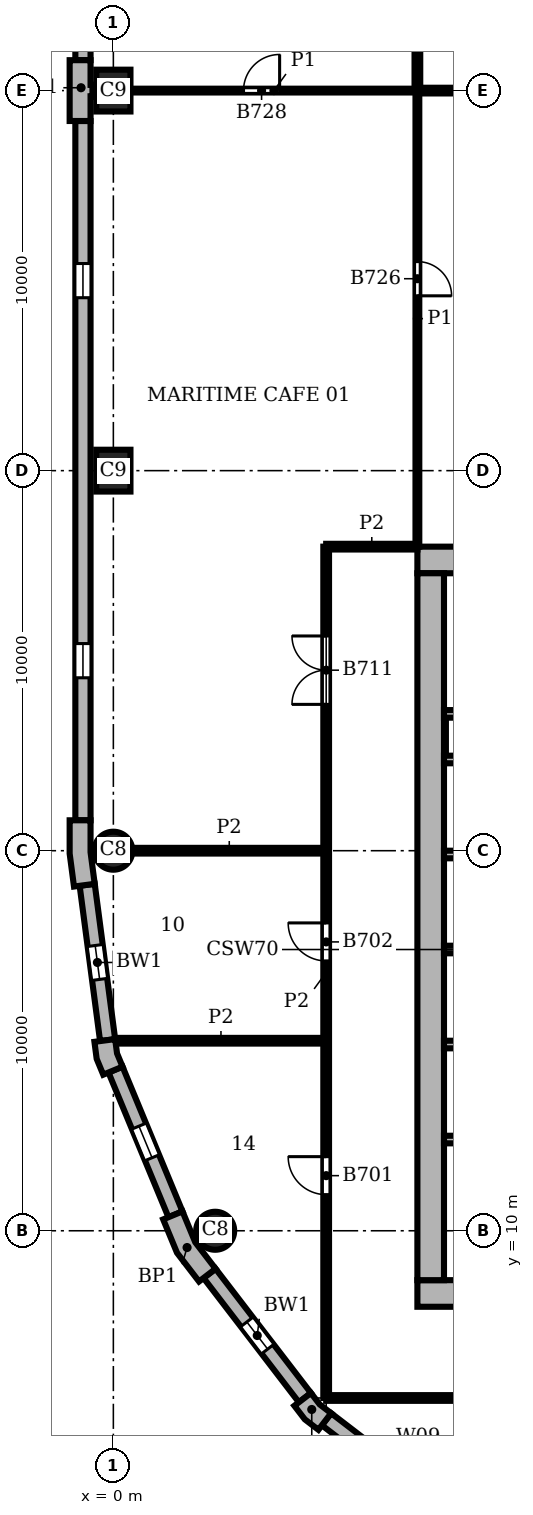
"""IFC4 building model, lengths in metres.
Left out: names, types, materials, properties, quantities, classifications, styles, units other than length and angle.
Written with IfcOpenShell. Run it as: python <this file> out.ifc"""

import sys

from ifc_helpers import new_model, si_unit, direction, frame, frame_2d, origin, origin_2d, place, context, subcontext, project, spatial, polyline, rectangle, circle, outline, extrude, element, fill, save


model = new_model("IFC4")
c1 = context("Model", 3, precision=1e-05, world=origin(), true_north=direction((0.0, 1.0)))
c2 = subcontext(c1, "Body", "Model", "MODEL_VIEW")
j1 = project(units=[si_unit("LENGTHUNIT", "METRE"), si_unit("PLANEANGLEUNIT", "RADIAN")], contexts=[c1])
p1 = place(None, origin())
s1 = spatial("IfcSite", under=j1, at=p1, CompositionType="ELEMENT")
p2 = place(p1, origin())
s2 = spatial("IfcBuilding", under=s1, at=p2, CompositionType="ELEMENT")
p3 = place(p2, frame((0.0, 0.0, 209.7)))
s3 = spatial("IfcBuildingStorey", under=s2, at=p3, CompositionType="ELEMENT", Elevation=209.7)
for number, where, z_axis, x_axis in (
    (1, (0.0, 40.0, 0.0), (0.0, 0.0, 1.0), (0.0, 1.0, 0.0)),
    (2, (0.0, 30.0, 0.0), (0.0, 0.0, 1.0), (0.0, 1.0, 0.0)),
):
    element("IfcColumn", number, at=place(p3, frame(where, z_axis=z_axis, x_axis=x_axis)), inside=s3, PredefinedType="COLUMN", context=c2, shape_type="SweptSolid", body=[
        extrude(rectangle(XDim=1.1, YDim=0.9, at=origin_2d()), origin(), (0.0, 0.0, 1.0), 3.9),
    ])
for number, where, z_axis, x_axis in (
    (3, (0.0, 20.0, 0.0), (0.0, 0.0, 1.0), (1.0, 0.0, 0.0)),
    (4, (2.679, 10.0, 0.0), (0.0, 0.0, 1.0), (1.0, 0.0, 0.0)),
):
    element("IfcColumn", number, at=place(p3, frame(where, z_axis=z_axis, x_axis=x_axis)), inside=s3, PredefinedType="COLUMN", context=c2, shape_type="SweptSolid", body=[
        extrude(circle(Radius=0.5, at=origin_2d()), origin(), (0.0, 0.0, 1.0), 3.9),
    ])
for number, where, z_axis, x_axis in (
    (5, (8.0, 8.35, 0.0), (0.0, 0.0, 1.0), (1.0, 0.0, 0.0)),
    (6, (28.0, 27.65, 0.0), (0.0, 0.0, 1.0), (-1.0, 0.0, 0.0)),
):
    element("IfcWall", number, at=place(p3, frame(where, z_axis=z_axis, x_axis=x_axis)), inside=s3, PredefinedType="SHEAR", context=c2, shape_type="SweptSolid", body=[
        extrude(rectangle(XDim=20.0, YDim=0.7, at=frame_2d((10.0, 0.0))), origin(), (0.0, 0.0, 1.0), 3.9),
    ])
p4 = place(p3, frame((8.35, 27.3, 0.0), z_axis=(0.0, 0.0, 1.0), x_axis=(0.0, -1.0, 0.0)))
e7 = element("IfcWall", 7, at=p4, inside=s3, PredefinedType="SHEAR", context=c2, shape_type="SweptSolid", body=[
    extrude(rectangle(XDim=18.6, YDim=0.7, at=frame_2d((9.3, 0.0))), origin(), (0.0, 0.0, 1.0), 3.9),
])
p5 = place(p3, origin())
e8 = element("IfcWall", 8, at=p5, inside=s3, PredefinedType="SOLIDWALL", context=c2, shape_type="SweptSolid", body=[
    extrude(outline(polyline([(-0.6, 39.2), (-0.6, 39.85), (-0.55, 39.85), (-0.55, 40.15), (-0.6, 40.15), (-0.6, 40.8), (-1.0, 40.8), (-1.15, 40.8), (-1.15, 40.0), (-1.15, 39.2), (-1.0, 39.2), (-0.6, 39.2)])), origin(), (0.0, 0.0, 1.0), 3.9),
])
e9 = element("IfcWall", 9, at=p5, inside=s3, PredefinedType="SOLIDWALL", context=c2, shape_type="SweptSolid", body=[
    extrude(outline(polyline([(-1.0, 20.8), (-1.15, 20.8), (-1.15, 19.925), (-1.036, 19.057), (-0.887, 19.076), (-0.49, 19.128), (-0.6, 19.961), (-0.6, 20.8), (-1.0, 20.8)])), origin(), (0.0, 0.0, 1.0), 3.9),
])
e10 = element("IfcWall", 10, at=p5, inside=s3, PredefinedType="SOLIDWALL", context=c2, shape_type="SweptSolid", body=[
    extrude(outline(polyline([(-0.349, 14.99), (-0.498, 14.971), (-0.439, 14.523), (-0.266, 14.106), (-0.128, 14.164), (0.242, 14.317), (0.097, 14.667), (0.047, 15.043), (-0.349, 14.99)])), origin(), (0.0, 0.0, 1.0), 3.9),
])
e11 = element("IfcWall", 11, at=p5, inside=s3, PredefinedType="SOLIDWALL", context=c2, shape_type="SweptSolid", body=[
    extrude(outline(polyline([(1.449, 10.356), (1.311, 10.299), (1.675, 9.42), (2.254, 8.665), (2.373, 8.757), (2.69, 9.0), (2.155, 9.698), (1.819, 10.51), (1.449, 10.356)])), origin(), (0.0, 0.0, 1.0), 3.9),
])
e12 = element("IfcWall", 12, at=p5, inside=s3, PredefinedType="SOLIDWALL", context=c2, shape_type="SweptSolid", body=[
    extrude(outline(polyline([(4.882, 5.487), (4.763, 5.396), (5.038, 5.038), (5.396, 4.763), (5.487, 4.882), (5.731, 5.199), (5.43, 5.43), (5.199, 5.731), (4.882, 5.487)])), origin(), (0.0, 0.0, 1.0), 3.9),
])
p6 = place(p3, frame((-0.8, 59.2, 0.0), z_axis=(0.0, 0.0, 1.0), x_axis=(0.0, -1.0, 0.0)))
e13 = element("IfcWall", 13, at=p6, inside=s3, PredefinedType="SOLIDWALL", context=c2, shape_type="SweptSolid", body=[
    extrude(rectangle(XDim=18.4, YDim=0.4, at=frame_2d((9.2, 0.0))), origin(), (0.0, 0.0, 1.0), 3.9),
])
p7 = place(p6, frame((3.75, 0.0, 0.9)))
e14 = element("IfcOpeningElement", 14, at=p7, cuts=e13, PredefinedType="OPENING", context=c2, shape_type="SweptSolid", body=[
    extrude(rectangle(XDim=0.9, YDim=2.35, at=frame_2d((0.45, 1.175))), frame((0.0, 0.21, 0.0), z_axis=(0.0, -1.0, 0.0), x_axis=(1.0, 0.0, 0.0)), (0.0, 0.0, 1.0), 0.42),
])
p8 = place(p6, frame((13.75, 0.0, 0.9)))
e15 = element("IfcOpeningElement", 15, at=p8, cuts=e13, PredefinedType="OPENING", context=c2, shape_type="SweptSolid", body=[
    extrude(rectangle(XDim=0.9, YDim=2.35, at=frame_2d((0.45, 1.175))), frame((0.0, 0.21, 0.0), z_axis=(0.0, -1.0, 0.0), x_axis=(1.0, 0.0, 0.0)), (0.0, 0.0, 1.0), 0.42),
])
p9 = place(p3, frame((-0.8, 39.2, 0.0), z_axis=(0.0, 0.0, 1.0), x_axis=(0.0, -1.0, 0.0)))
e16 = element("IfcWall", 16, at=p9, inside=s3, PredefinedType="SOLIDWALL", context=c2, shape_type="SweptSolid", body=[
    extrude(rectangle(XDim=18.4, YDim=0.4, at=frame_2d((9.2, 0.0))), origin(), (0.0, 0.0, 1.0), 3.9),
])
p10 = place(p9, frame((3.75, 0.0, 0.9)))
e17 = element("IfcOpeningElement", 17, at=p10, cuts=e16, PredefinedType="OPENING", context=c2, shape_type="SweptSolid", body=[
    extrude(rectangle(XDim=0.9, YDim=2.35, at=frame_2d((0.45, 1.175))), frame((0.0, 0.21, 0.0), z_axis=(0.0, -1.0, 0.0), x_axis=(1.0, 0.0, 0.0)), (0.0, 0.0, 1.0), 0.42),
])
p11 = place(p9, frame((13.75, 0.0, 0.9)))
e18 = element("IfcOpeningElement", 18, at=p11, cuts=e16, PredefinedType="OPENING", context=c2, shape_type="SweptSolid", body=[
    extrude(rectangle(XDim=0.9, YDim=2.35, at=frame_2d((0.45, 1.175))), frame((0.0, 0.21, 0.0), z_axis=(0.0, -1.0, 0.0), x_axis=(1.0, 0.0, 0.0)), (0.0, 0.0, 1.0), 0.42),
])
p12 = place(p3, frame((-0.689, 19.102, 0.0), z_axis=(0.0, 0.0, 1.0), x_axis=(0.130514280502, -0.991446429508, 0.0)))
e19 = element("IfcWall", 19, at=p12, inside=s3, PredefinedType="SOLIDWALL", context=c2, shape_type="SweptSolid", body=[
    extrude(rectangle(XDim=4.121, YDim=0.4, at=frame_2d((2.061, 0.0))), origin(), (0.0, 0.0, 1.0), 3.9),
])
p13 = place(p12, frame((1.611, 0.0, 0.9)))
e20 = element("IfcOpeningElement", 20, at=p13, cuts=e19, PredefinedType="OPENING", context=c2, shape_type="SweptSolid", body=[
    extrude(rectangle(XDim=0.9, YDim=2.35, at=frame_2d((0.45, 1.175))), frame((0.0, 0.21, 0.0), z_axis=(0.0, -1.0, 0.0), x_axis=(1.0, 0.0, 0.0)), (0.0, 0.0, 1.0), 0.42),
])
p14 = place(p3, frame((0.057, 14.24, 0.0), z_axis=(0.0, 0.0, 1.0), x_axis=(0.382721546029, -0.923863744394, 0.0)))
e21 = element("IfcWall", 21, at=p14, inside=s3, PredefinedType="SOLIDWALL", context=c2, shape_type="SweptSolid", body=[
    extrude(rectangle(XDim=4.121, YDim=0.4, at=frame_2d((2.061, 0.0))), origin(), (0.0, 0.0, 1.0), 3.9),
])
p15 = place(p14, frame((1.611, 0.0, 0.9)))
e22 = element("IfcOpeningElement", 22, at=p15, cuts=e21, PredefinedType="OPENING", context=c2, shape_type="SweptSolid", body=[
    extrude(rectangle(XDim=0.9, YDim=2.35, at=frame_2d((0.45, 1.175))), frame((0.0, 0.21, 0.0), z_axis=(0.0, -1.0, 0.0), x_axis=(1.0, 0.0, 0.0)), (0.0, 0.0, 1.0), 0.42),
])
p16 = place(p3, frame((2.532, 8.878, 0.0), z_axis=(0.0, 0.0, 1.0), x_axis=(0.608759824817, -0.793354571229, 0.0)))
e23 = element("IfcWall", 23, at=p16, inside=s3, PredefinedType="SOLIDWALL", context=c2, shape_type="SweptSolid", body=[
    extrude(rectangle(XDim=4.121, YDim=0.4, at=frame_2d((2.061, 0.0))), origin(), (0.0, 0.0, 1.0), 3.9),
])
p17 = place(p16, frame((1.611, 0.0, 0.9)))
e24 = element("IfcOpeningElement", 24, at=p17, cuts=e23, PredefinedType="OPENING", context=c2, shape_type="SweptSolid", body=[
    extrude(rectangle(XDim=0.9, YDim=2.35, at=frame_2d((0.45, 1.175))), frame((0.0, 0.21, 0.0), z_axis=(0.0, -1.0, 0.0), x_axis=(1.0, 0.0, 0.0)), (0.0, 0.0, 1.0), 0.42),
])
p18 = place(p3, frame((5.609, 5.041, 0.0), z_axis=(0.0, 0.0, 1.0), x_axis=(0.793354571229, -0.608759824817, 0.0)))
e25 = element("IfcWall", 25, at=p18, inside=s3, PredefinedType="SOLIDWALL", context=c2, shape_type="SweptSolid", body=[
    extrude(rectangle(XDim=4.121, YDim=0.4, at=frame_2d((2.061, 0.0))), origin(), (0.0, 0.0, 1.0), 3.9),
])
p19 = place(p18, frame((1.611, 0.0, 0.9)))
e26 = element("IfcOpeningElement", 26, at=p19, cuts=e25, PredefinedType="OPENING", context=c2, shape_type="SweptSolid", body=[
    extrude(rectangle(XDim=0.9, YDim=2.35, at=frame_2d((0.45, 1.175))), frame((0.0, 0.21, 0.0), z_axis=(0.0, -1.0, 0.0), x_axis=(1.0, 0.0, 0.0)), (0.0, 0.0, 1.0), 0.42),
])
p20 = place(p3, frame((8.7, 12.4, 0.0), z_axis=(0.0, 0.0, 1.0), x_axis=(1.0, 0.0, 0.0)))
e27 = element("IfcWall", 27, at=p20, inside=s3, PredefinedType="SHEAR", context=c2, shape_type="SweptSolid", body=[
    extrude(rectangle(XDim=5.1, YDim=0.2, at=frame_2d((2.55, 0.0))), origin(), (0.0, 0.0, 1.0), 3.58),
])
for number, where, z_axis, x_axis in (
    (28, (8.7, 14.9, 0.0), (0.0, 0.0, 1.0), (1.0, 0.0, 0.0)),
    (29, (8.7, 17.4, 0.0), (0.0, 0.0, 1.0), (1.0, 0.0, 0.0)),
    (30, (8.7, 19.9, 0.0), (0.0, 0.0, 1.0), (1.0, 0.0, 0.0)),
    (31, (8.7, 22.4, 0.0), (0.0, 0.0, 1.0), (1.0, 0.0, 0.0)),
):
    element("IfcWall", number, at=place(p3, frame(where, z_axis=z_axis, x_axis=x_axis)), inside=s3, PredefinedType="SHEAR", context=c2, shape_type="SweptSolid", body=[
        extrude(rectangle(XDim=3.0, YDim=0.2, at=frame_2d((1.5, 0.0))), origin(), (0.0, 0.0, 1.0), 3.58),
    ])
p21 = place(p3, frame((8.7, 23.6, 0.0), z_axis=(0.0, 0.0, 1.0), x_axis=(1.0, 0.0, 0.0)))
e32 = element("IfcWall", 32, at=p21, inside=s3, PredefinedType="SHEAR", context=c2, shape_type="SweptSolid", body=[
    extrude(rectangle(XDim=5.1, YDim=0.2, at=frame_2d((2.55, 0.0))), origin(), (0.0, 0.0, 1.0), 3.58),
])
p22 = place(p3, frame((8.0, 28.0, 0.0), z_axis=(0.0, 0.0, 1.0), x_axis=(0.0, 1.0, 0.0)))
e33 = element("IfcWall", 33, at=p22, inside=s3, PredefinedType="PARTITIONING", context=c2, shape_type="SweptSolid", body=[
    extrude(rectangle(XDim=12.0, YDim=0.1, at=frame_2d((6.0, 0.0))), origin(), (0.0, 0.0, 1.0), 3.58),
])
p23 = place(p22, frame((6.6, 0.0, 0.0)))
e34 = element("IfcOpeningElement", 34, at=p23, cuts=e33, PredefinedType="OPENING", context=c2, shape_type="SweptSolid", body=[
    extrude(rectangle(XDim=0.9, YDim=2.1, at=frame_2d((0.45, 1.05))), frame((0.0, 0.06, 0.0), z_axis=(0.0, -1.0, 0.0), x_axis=(1.0, 0.0, 0.0)), (0.0, 0.0, 1.0), 0.12),
])
p24 = place(p3, frame((0.45, 40.0, 0.0), z_axis=(0.0, 0.0, 1.0), x_axis=(1.0, 0.0, 0.0)))
e35 = element("IfcWall", 35, at=p24, inside=s3, PredefinedType="PARTITIONING", context=c2, shape_type="SweptSolid", body=[
    extrude(rectangle(XDim=7.55, YDim=0.1, at=frame_2d((3.775, 0.0))), origin(), (0.0, 0.0, 1.0), 3.58),
])
p25 = place(p24, frame((2.975, 0.0, 0.0)))
e36 = element("IfcOpeningElement", 36, at=p25, cuts=e35, PredefinedType="OPENING", context=c2, shape_type="SweptSolid", body=[
    extrude(rectangle(XDim=0.95, YDim=2.1, at=frame_2d((0.475, 1.05))), frame((0.0, 0.06, 0.0), z_axis=(0.0, -1.0, 0.0), x_axis=(1.0, 0.0, 0.0)), (0.0, 0.0, 1.0), 0.12),
])
p26 = place(p3, frame((5.6, 5.6, 0.0), z_axis=(0.0, 0.0, 1.0), x_axis=(0.0, 1.0, 0.0)))
e37 = element("IfcWall", 37, at=p26, inside=s3, PredefinedType="PARTITIONING", context=c2, shape_type="SweptSolid", body=[
    extrude(rectangle(XDim=22.4, YDim=0.15, at=frame_2d((11.2, 0.0))), origin(), (0.0, 0.0, 1.0), 3.58),
])
p27 = place(p26, frame((5.35, 0.0, 0.0)))
e38 = element("IfcOpeningElement", 38, at=p27, cuts=e37, PredefinedType="OPENING", context=c2, shape_type="SweptSolid", body=[
    extrude(rectangle(XDim=1.0, YDim=2.1, at=frame_2d((0.5, 1.05))), frame((0.0, 0.085, 0.0), z_axis=(0.0, -1.0, 0.0), x_axis=(1.0, 0.0, 0.0)), (0.0, 0.0, 1.0), 0.17),
])
p28 = place(p26, frame((11.5, 0.0, 0.0)))
e39 = element("IfcOpeningElement", 39, at=p28, cuts=e37, PredefinedType="OPENING", context=c2, shape_type="SweptSolid", body=[
    extrude(rectangle(XDim=1.0, YDim=2.1, at=frame_2d((0.5, 1.05))), frame((0.0, 0.085, 0.0), z_axis=(0.0, -1.0, 0.0), x_axis=(1.0, 0.0, 0.0)), (0.0, 0.0, 1.0), 0.17),
])
p29 = place(p26, frame((18.25, 0.0, 0.0)))
e40 = element("IfcOpeningElement", 40, at=p29, cuts=e37, PredefinedType="OPENING", context=c2, shape_type="SweptSolid", body=[
    extrude(rectangle(XDim=1.8, YDim=2.1, at=frame_2d((0.9, 1.05))), frame((0.0, 0.085, 0.0), z_axis=(0.0, -1.0, 0.0), x_axis=(1.0, 0.0, 0.0)), (0.0, 0.0, 1.0), 0.17),
])
p30 = place(p3, frame((8.0, 40.0, 0.0), z_axis=(0.0, 0.0, 1.0), x_axis=(0.0, 1.0, 0.0)))
e41 = element("IfcWall", 41, at=p30, inside=s3, PredefinedType="PARTITIONING", context=c2, shape_type="SweptSolid", body=[
    extrude(rectangle(XDim=10.0, YDim=0.15, at=frame_2d((5.0, 0.0))), origin(), (0.0, 0.0, 1.0), 3.58),
])
p31 = place(p3, frame((5.6, 5.6, 0.0), z_axis=(0.0, 0.0, 1.0), x_axis=(1.0, 0.0, 0.0)))
e42 = element("IfcWall", 42, at=p31, inside=s3, PredefinedType="PARTITIONING", context=c2, shape_type="SweptSolid", body=[
    extrude(rectangle(XDim=25.4, YDim=0.15, at=frame_2d((12.7, 0.0))), origin(), (0.0, 0.0, 1.0), 3.58),
])
p32 = place(p31, frame((5.35, 0.0, 0.0)))
e43 = element("IfcOpeningElement", 43, at=p32, cuts=e42, PredefinedType="OPENING", context=c2, shape_type="SweptSolid", body=[
    extrude(rectangle(XDim=1.0, YDim=2.1, at=frame_2d((0.5, 1.05))), frame((0.0, 0.085, 0.0), z_axis=(0.0, -1.0, 0.0), x_axis=(1.0, 0.0, 0.0)), (0.0, 0.0, 1.0), 0.17),
])
p33 = place(p31, frame((11.25, 0.0, 0.0)))
e44 = element("IfcOpeningElement", 44, at=p33, cuts=e42, PredefinedType="OPENING", context=c2, shape_type="SweptSolid", body=[
    extrude(rectangle(XDim=1.0, YDim=2.1, at=frame_2d((0.5, 1.05))), frame((0.0, 0.085, 0.0), z_axis=(0.0, -1.0, 0.0), x_axis=(1.0, 0.0, 0.0)), (0.0, 0.0, 1.0), 0.17),
])
p34 = place(p31, frame((18.75, 0.0, 0.0)))
e45 = element("IfcOpeningElement", 45, at=p34, cuts=e42, PredefinedType="OPENING", context=c2, shape_type="SweptSolid", body=[
    extrude(rectangle(XDim=1.0, YDim=2.1, at=frame_2d((0.5, 1.05))), frame((0.0, 0.085, 0.0), z_axis=(0.0, -1.0, 0.0), x_axis=(1.0, 0.0, 0.0)), (0.0, 0.0, 1.0), 0.17),
])
p35 = place(p3, frame((0.063, 15.0, 0.0), z_axis=(0.0, 0.0, 1.0), x_axis=(1.0, 0.0, 0.0)))
e46 = element("IfcWall", 46, at=p35, inside=s3, PredefinedType="PARTITIONING", context=c2, shape_type="SweptSolid", body=[
    extrude(rectangle(XDim=5.537, YDim=0.15, at=frame_2d((2.769, 0.0))), origin(), (0.0, 0.0, 1.0), 3.58),
])
p36 = place(p3, frame((0.5, 20.0, 0.0), z_axis=(0.0, 0.0, 1.0), x_axis=(1.0, 0.0, 0.0)))
e47 = element("IfcWall", 47, at=p36, inside=s3, PredefinedType="PARTITIONING", context=c2, shape_type="SweptSolid", body=[
    extrude(rectangle(XDim=5.1, YDim=0.15, at=frame_2d((2.55, 0.0))), origin(), (0.0, 0.0, 1.0), 3.58),
])
p37 = place(p3, frame((5.6, 28.0, 0.0), z_axis=(0.0, 0.0, 1.0), x_axis=(1.0, 0.0, 0.0)))
e48 = element("IfcWall", 48, at=p37, inside=s3, PredefinedType="PARTITIONING", context=c2, shape_type="SweptSolid", body=[
    extrude(rectangle(XDim=2.4, YDim=0.15, at=frame_2d((1.2, 0.0))), origin(), (0.0, 0.0, 1.0), 3.58),
])
p38 = place(p3, frame((8.0, 40.0, 0.0), z_axis=(0.0, 0.0, 1.0), x_axis=(1.0, 0.0, 0.0)))
e49 = element("IfcWall", 49, at=p38, inside=s3, PredefinedType="PARTITIONING", context=c2, shape_type="SweptSolid", body=[
    extrude(rectangle(XDim=1.35, YDim=0.15, at=frame_2d((0.675, 0.0))), origin(), (0.0, 0.0, 1.0), 3.58),
])
p39 = place(p10, origin())
e50 = element("IfcWindow", 50, at=p39, inside=s3, PartitioningType="SINGLE_PANEL", PredefinedType="WINDOW", context=c2, shape_type="SweptSolid", body=[
    extrude(rectangle(XDim=0.9, YDim=2.35, at=frame_2d((0.45, 1.175))), frame((0.0, 0.16, 0.0), z_axis=(0.0, -1.0, 0.0), x_axis=(1.0, 0.0, 0.0)), (0.0, 0.0, 1.0), 0.06),
])
fill(e17, e50)
p40 = place(p11, origin())
e51 = element("IfcWindow", 51, at=p40, inside=s3, PartitioningType="SINGLE_PANEL", PredefinedType="WINDOW", context=c2, shape_type="SweptSolid", body=[
    extrude(rectangle(XDim=0.9, YDim=2.35, at=frame_2d((0.45, 1.175))), frame((0.0, 0.16, 0.0), z_axis=(0.0, -1.0, 0.0), x_axis=(1.0, 0.0, 0.0)), (0.0, 0.0, 1.0), 0.06),
])
fill(e18, e51)
p41 = place(p13, origin())
e52 = element("IfcWindow", 52, at=p41, inside=s3, PartitioningType="SINGLE_PANEL", PredefinedType="WINDOW", context=c2, shape_type="SweptSolid", body=[
    extrude(rectangle(XDim=0.9, YDim=2.35, at=frame_2d((0.45, 1.175))), frame((0.0, 0.16, 0.0), z_axis=(0.0, -1.0, 0.0), x_axis=(1.0, 0.0, 0.0)), (0.0, 0.0, 1.0), 0.06),
])
fill(e20, e52)
p42 = place(p15, origin())
e53 = element("IfcWindow", 53, at=p42, inside=s3, PartitioningType="SINGLE_PANEL", PredefinedType="WINDOW", context=c2, shape_type="SweptSolid", body=[
    extrude(rectangle(XDim=0.9, YDim=2.35, at=frame_2d((0.45, 1.175))), frame((0.0, 0.16, 0.0), z_axis=(0.0, -1.0, 0.0), x_axis=(1.0, 0.0, 0.0)), (0.0, 0.0, 1.0), 0.06),
])
fill(e22, e53)
p43 = place(p17, origin())
e54 = element("IfcWindow", 54, at=p43, inside=s3, PartitioningType="SINGLE_PANEL", PredefinedType="WINDOW", context=c2, shape_type="SweptSolid", body=[
    extrude(rectangle(XDim=0.9, YDim=2.35, at=frame_2d((0.45, 1.175))), frame((0.0, 0.16, 0.0), z_axis=(0.0, -1.0, 0.0), x_axis=(1.0, 0.0, 0.0)), (0.0, 0.0, 1.0), 0.06),
])
fill(e24, e54)
p44 = place(p27, origin())
e55 = element("IfcDoor", 55, at=p44, inside=s3, OperationType="SINGLE_SWING_RIGHT", PredefinedType="DOOR", context=c2, shape_type="SweptSolid", body=[
    extrude(rectangle(XDim=1.0, YDim=2.1, at=frame_2d((0.5, 1.05))), frame((0.0, 0.025, 0.0), z_axis=(0.0, -1.0, 0.0), x_axis=(1.0, 0.0, 0.0)), (0.0, 0.0, 1.0), 0.05),
])
fill(e38, e55)
p45 = place(p28, origin())
e56 = element("IfcDoor", 56, at=p45, inside=s3, OperationType="SINGLE_SWING_RIGHT", PredefinedType="DOOR", context=c2, shape_type="SweptSolid", body=[
    extrude(rectangle(XDim=1.0, YDim=2.1, at=frame_2d((0.5, 1.05))), frame((0.0, 0.025, 0.0), z_axis=(0.0, -1.0, 0.0), x_axis=(1.0, 0.0, 0.0)), (0.0, 0.0, 1.0), 0.05),
])
fill(e39, e56)
p46 = place(p29, origin())
e57 = element("IfcDoor", 57, at=p46, inside=s3, OperationType="DOUBLE_DOOR_SINGLE_SWING", PredefinedType="DOOR", context=c2, shape_type="SweptSolid", body=[
    extrude(rectangle(XDim=1.8, YDim=2.1, at=frame_2d((0.9, 1.05))), frame((0.0, 0.025, 0.0), z_axis=(0.0, -1.0, 0.0), x_axis=(1.0, 0.0, 0.0)), (0.0, 0.0, 1.0), 0.05),
])
fill(e40, e57)
p47 = place(p23, frame((0.9, 0.0, 0.0), z_axis=(0.0, 0.0, 1.0), x_axis=(-1.0, 0.0, 0.0)))
e58 = element("IfcDoor", 58, at=p47, inside=s3, OperationType="SINGLE_SWING_RIGHT", PredefinedType="DOOR", context=c2, shape_type="SweptSolid", body=[
    extrude(rectangle(XDim=0.9, YDim=2.1, at=frame_2d((0.45, 1.05))), frame((0.0, 0.025, 0.0), z_axis=(0.0, -1.0, 0.0), x_axis=(1.0, 0.0, 0.0)), (0.0, 0.0, 1.0), 0.05),
])
fill(e34, e58)
p48 = place(p25, origin())
e59 = element("IfcDoor", 59, at=p48, inside=s3, OperationType="SINGLE_SWING_RIGHT", PredefinedType="DOOR", context=c2, shape_type="SweptSolid", body=[
    extrude(rectangle(XDim=0.95, YDim=2.1, at=frame_2d((0.475, 1.05))), frame((0.0, 0.025, 0.0), z_axis=(0.0, -1.0, 0.0), x_axis=(1.0, 0.0, 0.0)), (0.0, 0.0, 1.0), 0.05),
])
fill(e36, e59)
save(model, sys.argv[1])
